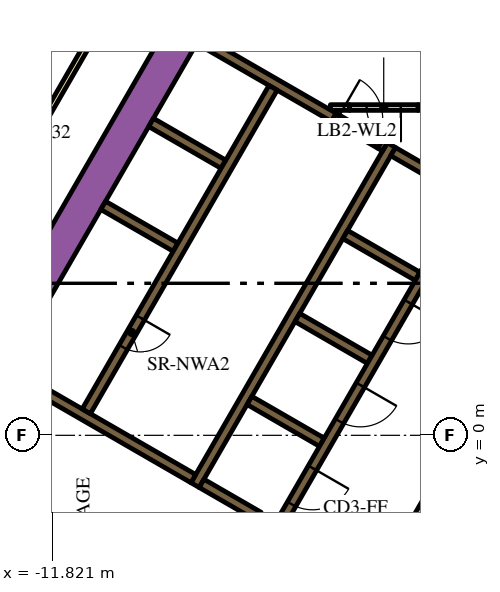
"""IFC4 building model, lengths in metres.
Left out: names, types, materials, properties, quantities, classifications, styles, units other than length and angle.
Written with IfcOpenShell. Run it as: python <this file> out.ifc"""

import sys

from ifc_helpers import new_model, si_unit, direction, frame, frame_2d, origin, place, context, subcontext, project, spatial, polyline, rectangle, outline, extrude, element, fill, save


model = new_model("IFC4")
c1 = context("Model", 3, precision=1e-05, world=origin(), true_north=direction((0.0, 1.0)))
c2 = subcontext(c1, "Body", "Model", "MODEL_VIEW")
j1 = project(units=[si_unit("LENGTHUNIT", "METRE"), si_unit("PLANEANGLEUNIT", "RADIAN")], contexts=[c1])
p1 = place(None, origin())
s1 = spatial("IfcSite", under=j1, at=p1, CompositionType="ELEMENT")
p2 = place(p1, origin())
s2 = spatial("IfcBuilding", under=s1, at=p2, CompositionType="ELEMENT")
p3 = place(p2, frame((0.0, 0.0, 74.4)))
s3 = spatial("IfcBuildingStorey", under=s2, at=p3, CompositionType="ELEMENT", Elevation=74.4)
p4 = place(p3, frame((-15.36, -1.503, 0.0), z_axis=(0.0, 0.0, 1.0), x_axis=(0.50000389221, 0.866023156604, 0.0)))
e1 = element("IfcWall", 1, at=p4, inside=s3, PredefinedType="SOLIDWALL", context=c2, shape_type="SweptSolid", body=[
    extrude(rectangle(XDim=21.0, YDim=0.9, at=frame_2d((10.5, 0.0))), origin(), (0.0, 0.0, 1.0), 3.9),
])
p5 = place(p3, frame((-8.06, -1.311, 0.0), z_axis=(0.0, 0.0, 1.0), x_axis=(0.50000273126, 0.866023826885, 0.0)))
e2 = element("IfcWall", 2, at=p5, inside=s3, PredefinedType="SOLIDWALL", context=c2, shape_type="SweptSolid", body=[
    extrude(rectangle(XDim=10.33, YDim=0.25, at=frame_2d((5.165, 0.0))), origin(), (0.0, 0.0, 1.0), 3.9),
])
p6 = place(p3, frame((-1.647, 6.771, 0.0), z_axis=(0.0, 0.0, 1.0), x_axis=(-0.865971728693, 0.500092956464, 0.0)))
e3 = element("IfcWall", 3, at=p6, inside=s3, PredefinedType="SOLIDWALL", context=c2, shape_type="SweptSolid", body=[
    extrude(rectangle(XDim=1.388, YDim=0.25, at=frame_2d((0.694, 0.0))), origin(), (0.0, 0.0, 1.0), 3.9),
])
for number, where, z_axis, x_axis in (
    (4, (-2.204, 4.182, 0.0), (0.0, 0.0, 1.0), (-0.866, 0.5, 0.0)),
    (5, (-5.369, 3.1, 0.0), (0.0, 0.0, 1.0), (0.866, -0.5, 0.0)),
    (6, (-4.724, -0.182, 0.0), (0.0, 0.0, 1.0), (-0.866, 0.5, 0.0)),
):
    element("IfcWall", number, at=place(p3, frame(where, z_axis=z_axis, x_axis=x_axis)), inside=s3, PredefinedType="SOLIDWALL", context=c2, shape_type="SweptSolid", body=[
        extrude(rectangle(XDim=2.2, YDim=0.25, at=frame_2d((1.1, 0.0))), origin(), (0.0, 0.0, 1.0), 3.9),
    ])
p7 = place(p3, frame((-7.889, -1.265, 0.0), z_axis=(0.0, 0.0, 1.0), x_axis=(0.865986741702, -0.500066958712, 0.0)))
e7 = element("IfcWall", 7, at=p7, inside=s3, PredefinedType="SOLIDWALL", context=c2, shape_type="SweptSolid", body=[
    extrude(rectangle(XDim=1.738, YDim=0.25, at=frame_2d((0.869, 0.0))), origin(), (0.0, 0.0, 1.0), 3.9),
])
p8 = place(p3, frame((-8.106, -1.14, 0.0), z_axis=(0.0, 0.0, 1.0), x_axis=(-0.866000643155, 0.500042884217, 0.0)))
e8 = element("IfcWall", 8, at=p8, inside=s3, PredefinedType="SOLIDWALL", context=c2, shape_type="SweptSolid", body=[
    extrude(rectangle(XDim=5.65, YDim=0.25, at=frame_2d((2.825, 0.0))), origin(), (0.0, 0.0, 1.0), 3.9),
])
p9 = place(p3, origin())
e9 = element("IfcWall", 9, at=p9, inside=s3, PredefinedType="SOLIDWALL", context=c2, shape_type="SweptSolid", body=[
    extrude(outline(polyline([(-3.128, 7.481), (-3.259, 7.557), (-3.134, 7.773), (-3.003, 7.698), (-3.128, 7.481)])), origin(), (0.0, 0.0, 1.0), 3.9),
])
for number, where, z_axis, x_axis in (
    (10, (-8.574, 4.95, 0.0), (0.0, 0.0, 1.0), (-0.866, 0.5, 0.0)),
    (11, (-7.314, 7.132, 0.0), (0.0, 0.0, 1.0), (-0.866, 0.5, 0.0)),
):
    element("IfcWall", number, at=place(p3, frame(where, z_axis=z_axis, x_axis=x_axis)), inside=s3, PredefinedType="SOLIDWALL", context=c2, shape_type="SweptSolid", body=[
        extrude(rectangle(XDim=2.2, YDim=0.25, at=frame_2d((1.1, 0.0))), origin(), (0.0, 0.0, 1.0), 3.9),
    ])
p10 = place(p3, frame((-7.959, 10.415, 0.0), z_axis=(0.0, 0.0, 1.0), x_axis=(0.866020958405, -0.500007699544, 0.0)))
e12 = element("IfcWall", 12, at=p10, inside=s3, PredefinedType="SOLIDWALL", context=c2, shape_type="SweptSolid", body=[
    extrude(rectangle(XDim=4.1, YDim=0.25, at=frame_2d((2.05, 0.0))), origin(), (0.0, 0.0, 1.0), 3.9),
])
p11 = place(p3, frame((-3.147, -3.718, 0.0), z_axis=(0.0, 0.0, 1.0), x_axis=(0.500010131483, 0.866019554291, 0.0)))
e13 = element("IfcWall", 13, at=p11, inside=s3, PredefinedType="PARTITIONING", context=c2, shape_type="SweptSolid", body=[
    extrude(rectangle(XDim=3.894, YDim=0.15, at=frame_2d((1.947, 0.0))), origin(), (0.0, 0.0, 1.0), 2.7),
])
p12 = place(p3, frame((-3.997, 8.625, 0.0), z_axis=(0.0, 0.0, 1.0), x_axis=(-1.0, 0.0, 0.0)))
e14 = element("IfcWall", 14, at=p12, inside=s3, PredefinedType="PARTITIONING", context=c2, shape_type="SweptSolid", body=[
    extrude(rectangle(XDim=0.502, YDim=0.15, at=frame_2d((0.251, 0.0))), origin(), (0.0, 0.0, 1.0), 2.7),
])
p13 = place(p3, frame((-2.196, 8.625, 0.0), z_axis=(0.0, 0.0, 1.0), x_axis=(1.0, 0.0, 0.0)))
e15 = element("IfcWall", 15, at=p13, inside=s3, PredefinedType="PARTITIONING", context=c2, shape_type="SweptSolid", body=[
    extrude(rectangle(XDim=1.146, YDim=0.15, at=frame_2d((0.573, 0.0))), origin(), (0.0, 0.0, 1.0), 2.7),
])
p14 = place(p3, frame((-6.008, 9.144, 0.0), z_axis=(0.0, 0.0, 1.0), x_axis=(-0.500006956611, -0.866021387346, 0.0)))
e16 = element("IfcWall", 16, at=p14, inside=s3, PredefinedType="SOLIDWALL", context=c2, shape_type="SweptSolid", body=[
    extrude(rectangle(XDim=9.83, YDim=0.25, at=frame_2d((4.915, 0.0))), origin(), (0.0, 0.0, 1.0), 3.9),
])
p15 = place(p14, frame((6.985, 0.0, 0.0)))
e17 = element("IfcOpeningElement", 17, at=p15, cuts=e16, PredefinedType="OPENING", context=c2, shape_type="SweptSolid", body=[
    extrude(rectangle(XDim=0.9, YDim=2.1, at=frame_2d((0.45, 1.05))), frame((0.0, 0.135, 0.0), z_axis=(0.0, -1.0, 0.0), x_axis=(1.0, 0.0, 0.0)), (0.0, 0.0, 1.0), 0.27),
])
p16 = place(p3, frame((-0.898, 6.194, 0.0), z_axis=(0.0, 0.0, 1.0), x_axis=(-0.499996202215, -0.866027596426, 0.0)))
e18 = element("IfcWall", 18, at=p16, inside=s3, PredefinedType="SOLIDWALL", context=c2, shape_type="SweptSolid", body=[
    extrude(rectangle(XDim=9.83, YDim=0.25, at=frame_2d((4.915, 0.0))), origin(), (0.0, 0.0, 1.0), 3.9),
])
p17 = place(p16, frame((0.585, 0.0, 0.0)))
e19 = element("IfcOpeningElement", 19, at=p17, cuts=e18, PredefinedType="OPENING", context=c2, shape_type="SweptSolid", body=[
    extrude(rectangle(XDim=1.1, YDim=2.1, at=frame_2d((0.55, 1.05))), frame((0.0, 0.135, 0.0), z_axis=(0.0, -1.0, 0.0), x_axis=(1.0, 0.0, 0.0)), (0.0, 0.0, 1.0), 0.27),
])
p18 = place(p16, frame((3.105, 0.0, 0.0)))
e20 = element("IfcOpeningElement", 20, at=p18, cuts=e18, PredefinedType="OPENING", context=c2, shape_type="SweptSolid", body=[
    extrude(rectangle(XDim=1.1, YDim=2.1, at=frame_2d((0.55, 1.05))), frame((0.0, 0.135, 0.0), z_axis=(0.0, -1.0, 0.0), x_axis=(1.0, 0.0, 0.0)), (0.0, 0.0, 1.0), 0.27),
])
p19 = place(p16, frame((5.625, 0.0, 0.0)))
e21 = element("IfcOpeningElement", 21, at=p19, cuts=e18, PredefinedType="OPENING", context=c2, shape_type="SweptSolid", body=[
    extrude(rectangle(XDim=1.1, YDim=2.1, at=frame_2d((0.55, 1.05))), frame((0.0, 0.135, 0.0), z_axis=(0.0, -1.0, 0.0), x_axis=(1.0, 0.0, 0.0)), (0.0, 0.0, 1.0), 0.27),
])
p20 = place(p16, frame((8.145, 0.0, 0.0)))
e22 = element("IfcOpeningElement", 22, at=p20, cuts=e18, PredefinedType="OPENING", context=c2, shape_type="SweptSolid", body=[
    extrude(rectangle(XDim=1.1, YDim=2.1, at=frame_2d((0.55, 1.05))), frame((0.0, 0.135, 0.0), z_axis=(0.0, -1.0, 0.0), x_axis=(1.0, 0.0, 0.0)), (0.0, 0.0, 1.0), 0.27),
])
p21 = place(p3, frame((-2.196, 8.625, 0.0), z_axis=(0.0, 0.0, 1.0), x_axis=(-1.0, 0.0, 0.0)))
e23 = element("IfcWall", 23, at=p21, inside=s3, PredefinedType="PARTITIONING", context=c2, shape_type="SweptSolid", body=[
    extrude(rectangle(XDim=1.8, YDim=0.15, at=frame_2d((0.9, 0.0))), origin(), (0.0, 0.0, 1.0), 2.7),
])
p22 = place(p21, frame((0.45, 0.0, 0.0)))
e24 = element("IfcOpeningElement", 24, at=p22, cuts=e23, PredefinedType="OPENING", context=c2, shape_type="SweptSolid", body=[
    extrude(rectangle(XDim=0.9, YDim=2.1, at=frame_2d((0.45, 1.05))), frame((0.0, 0.085, 0.0), z_axis=(0.0, -1.0, 0.0), x_axis=(1.0, 0.0, 0.0)), (0.0, 0.0, 1.0), 0.17),
])
p23 = place(p3, frame((-4.409, 8.365, 0.0), z_axis=(0.0, 0.0, 1.0), x_axis=(0.866034573852, -0.49998411664, 0.0)))
e25 = element("IfcWall", 25, at=p23, inside=s3, PredefinedType="SOLIDWALL", context=c2, shape_type="SweptSolid", body=[
    extrude(rectangle(XDim=1.4, YDim=0.25, at=frame_2d((0.7, 0.0))), origin(), (0.0, 0.0, 1.0), 3.9),
])
p24 = place(p23, frame((0.1, 0.0, 0.0)))
e26 = element("IfcOpeningElement", 26, at=p24, cuts=e25, PredefinedType="OPENING", context=c2, shape_type="SweptSolid", body=[
    extrude(rectangle(XDim=1.2, YDim=2.1, at=frame_2d((0.6, 1.05))), frame((0.0, 0.135, 0.0), z_axis=(0.0, -1.0, 0.0), x_axis=(1.0, 0.0, 0.0)), (0.0, 0.0, 1.0), 0.27),
])
p25 = place(p3, frame((-19.081, -3.9, 0.0), z_axis=(0.0, 0.0, 1.0), x_axis=(0.499998313975, 0.866026377209, 0.0)))
e27 = element("IfcWall", 27, at=p25, inside=s3, PredefinedType="PARTITIONING", context=c2, shape_type="SweptSolid", body=[
    extrude(rectangle(XDim=25.766, YDim=0.15, at=frame_2d((12.883, 0.0))), origin(), (0.0, 0.0, 1.0), 2.7),
])
p26 = place(p25, frame((24.265, 0.0, 0.0)))
e28 = element("IfcOpeningElement", 28, at=p26, cuts=e27, PredefinedType="OPENING", context=c2, shape_type="SweptSolid", body=[
    extrude(rectangle(XDim=1.0, YDim=2.1, at=frame_2d((0.5, 1.05))), frame((0.0, 0.085, 0.0), z_axis=(0.0, -1.0, 0.0), x_axis=(1.0, 0.0, 0.0)), (0.0, 0.0, 1.0), 0.17),
])
p27 = place(p25, frame((13.146, 0.0, 0.0)))
e29 = element("IfcOpeningElement", 29, at=p27, cuts=e27, PredefinedType="OPENING", context=c2, shape_type="SweptSolid", body=[
    extrude(rectangle(XDim=1.1, YDim=2.1, at=frame_2d((0.55, 1.05))), frame((0.0, 0.085, 0.0), z_axis=(0.0, -1.0, 0.0), x_axis=(1.0, 0.0, 0.0)), (0.0, 0.0, 1.0), 0.17),
])
p28 = place(p25, frame((11.693, 0.0, 0.0)))
e30 = element("IfcOpeningElement", 30, at=p28, cuts=e27, PredefinedType="OPENING", context=c2, shape_type="SweptSolid", body=[
    extrude(rectangle(XDim=1.0, YDim=2.1, at=frame_2d((0.5, 1.05))), frame((0.0, 0.085, 0.0), z_axis=(0.0, -1.0, 0.0), x_axis=(1.0, 0.0, 0.0)), (0.0, 0.0, 1.0), 0.17),
])
p29 = place(p25, frame((0.18, 0.0, 0.0)))
e31 = element("IfcOpeningElement", 31, at=p29, cuts=e27, PredefinedType="OPENING", context=c2, shape_type="SweptSolid", body=[
    extrude(rectangle(XDim=1.0, YDim=2.1, at=frame_2d((0.5, 1.05))), frame((0.0, 0.085, 0.0), z_axis=(0.0, -1.0, 0.0), x_axis=(1.0, 0.0, 0.0)), (0.0, 0.0, 1.0), 0.17),
])
p30 = place(p15, origin())
e32 = element("IfcDoor", 32, at=p30, inside=s3, OperationType="SINGLE_SWING_LEFT", PredefinedType="DOOR", context=c2, shape_type="SweptSolid", body=[
    extrude(rectangle(XDim=0.9, YDim=2.1, at=frame_2d((0.45, 1.05))), frame((0.0, 0.025, 0.0), z_axis=(0.0, -1.0, 0.0), x_axis=(1.0, 0.0, 0.0)), (0.0, 0.0, 1.0), 0.05),
])
fill(e17, e32)
p31 = place(p18, origin())
e33 = element("IfcDoor", 33, at=p31, inside=s3, OperationType="DOUBLE_DOOR_SLIDING", PredefinedType="DOOR", context=c2, shape_type="SweptSolid", body=[
    extrude(rectangle(XDim=1.1, YDim=2.1, at=frame_2d((0.55, 1.05))), frame((0.0, 0.025, 0.0), z_axis=(0.0, -1.0, 0.0), x_axis=(1.0, 0.0, 0.0)), (0.0, 0.0, 1.0), 0.05),
])
fill(e20, e33)
p32 = place(p19, origin())
e34 = element("IfcDoor", 34, at=p32, inside=s3, OperationType="DOUBLE_DOOR_SLIDING", PredefinedType="DOOR", context=c2, shape_type="SweptSolid", body=[
    extrude(rectangle(XDim=1.1, YDim=2.1, at=frame_2d((0.55, 1.05))), frame((0.0, 0.025, 0.0), z_axis=(0.0, -1.0, 0.0), x_axis=(1.0, 0.0, 0.0)), (0.0, 0.0, 1.0), 0.05),
])
fill(e21, e34)
p33 = place(p20, origin())
e35 = element("IfcDoor", 35, at=p33, inside=s3, OperationType="DOUBLE_DOOR_SLIDING", PredefinedType="DOOR", context=c2, shape_type="SweptSolid", body=[
    extrude(rectangle(XDim=1.1, YDim=2.1, at=frame_2d((0.55, 1.05))), frame((0.0, 0.025, 0.0), z_axis=(0.0, -1.0, 0.0), x_axis=(1.0, 0.0, 0.0)), (0.0, 0.0, 1.0), 0.05),
])
fill(e22, e35)
p34 = place(p22, origin())
e36 = element("IfcDoor", 36, at=p34, inside=s3, OperationType="SINGLE_SWING_LEFT", PredefinedType="DOOR", context=c2, shape_type="SweptSolid", body=[
    extrude(rectangle(XDim=0.9, YDim=2.1, at=frame_2d((0.45, 1.05))), frame((0.0, 0.025, 0.0), z_axis=(0.0, -1.0, 0.0), x_axis=(1.0, 0.0, 0.0)), (0.0, 0.0, 1.0), 0.05),
])
fill(e24, e36)
p35 = place(p24, origin())
e37 = element("IfcDoor", 37, at=p35, inside=s3, OperationType="SINGLE_SWING_LEFT", PredefinedType="DOOR", context=c2, shape_type="SweptSolid", body=[
    extrude(rectangle(XDim=1.2, YDim=2.1, at=frame_2d((0.6, 1.05))), frame((0.0, 0.025, 0.0), z_axis=(0.0, -1.0, 0.0), x_axis=(1.0, 0.0, 0.0)), (0.0, 0.0, 1.0), 0.05),
])
fill(e26, e37)
save(model, sys.argv[1])
